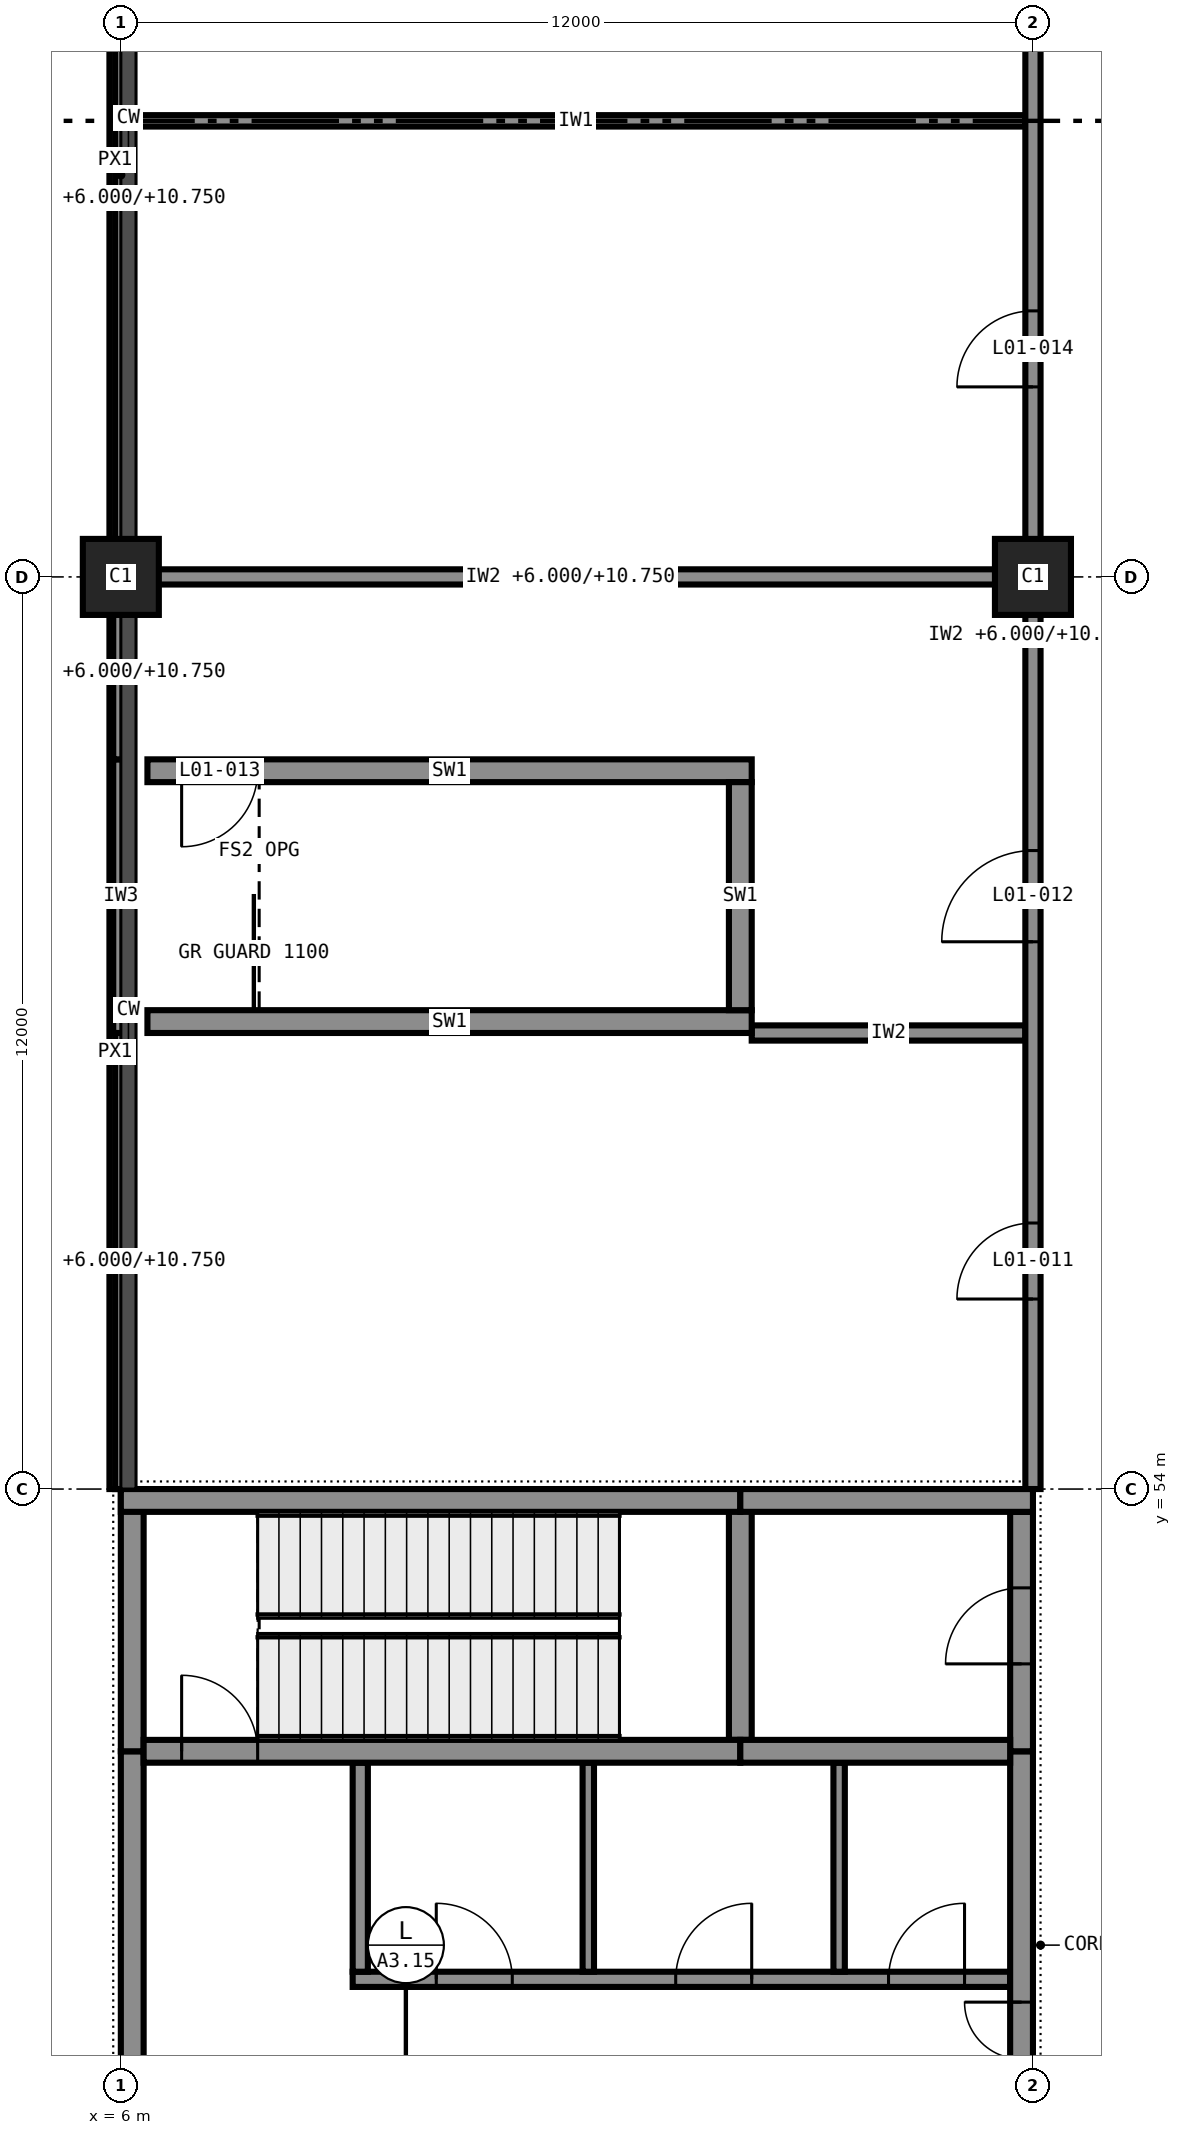
"""IFC4 building model, lengths in metres.
Left out: names, types, materials, properties, quantities, classifications, styles, units other than length and angle.
Written with IfcOpenShell. Run it as: python <this file> out.ifc"""

import sys

from ifc_helpers import new_model, si_unit, direction, frame, frame_2d, origin, origin_2d, place, context, subcontext, project, spatial, rectangle, extrude, element, fill, save


model = new_model("IFC4")
c1 = context("Model", 3, precision=1e-05, world=origin(), true_north=direction((0.0, 1.0)))
c2 = subcontext(c1, "Body", "Model", "MODEL_VIEW")
j1 = project(units=[si_unit("LENGTHUNIT", "METRE"), si_unit("PLANEANGLEUNIT", "RADIAN")], contexts=[c1])
p1 = place(None, origin())
s1 = spatial("IfcSite", under=j1, at=p1, CompositionType="ELEMENT")
p2 = place(p1, origin())
s2 = spatial("IfcBuilding", under=s1, at=p2, CompositionType="ELEMENT")
p3 = place(p2, frame((0.0, 0.0, 6.0)))
s3 = spatial("IfcBuildingStorey", under=s2, at=p3, CompositionType="ELEMENT", Elevation=6.0)
for number, where, z_axis, x_axis in (
    (1, (6.0, 66.0, 0.0), (0.0, 0.0, 1.0), (1.0, 0.0, 0.0)),
    (2, (18.0, 66.0, 0.0), (0.0, 0.0, 1.0), (1.0, 0.0, 0.0)),
):
    element("IfcColumn", number, at=place(p3, frame(where, z_axis=z_axis, x_axis=x_axis)), inside=s3, PredefinedType="COLUMN", context=c2, shape_type="SweptSolid", body=[
        extrude(rectangle(XDim=1.0, YDim=1.0, at=origin_2d()), origin(), (0.0, 0.0, 1.0), 6.0),
    ])
p4 = place(p3, frame((6.35, 60.15, 0.0), z_axis=(0.0, 0.0, 1.0), x_axis=(1.0, 0.0, 0.0)))
e3 = element("IfcWall", 3, at=p4, inside=s3, PredefinedType="SHEAR", context=c2, shape_type="SweptSolid", body=[
    extrude(rectangle(XDim=7.95, YDim=0.3, at=frame_2d((3.975, 0.0))), origin(), (0.0, 0.0, 1.0), 5.75),
])
p5 = place(p3, frame((6.35, 63.45, 0.0), z_axis=(0.0, 0.0, 1.0), x_axis=(1.0, 0.0, 0.0)))
e4 = element("IfcWall", 4, at=p5, inside=s3, PredefinedType="SHEAR", context=c2, shape_type="SweptSolid", body=[
    extrude(rectangle(XDim=7.95, YDim=0.3, at=frame_2d((3.975, 0.0))), origin(), (0.0, 0.0, 1.0), 5.75),
])
p6 = place(p5, frame((0.45, 0.0, 0.0)))
e5 = element("IfcOpeningElement", 5, at=p6, cuts=e4, PredefinedType="OPENING", context=c2, shape_type="SweptSolid", body=[
    extrude(rectangle(XDim=1.0, YDim=2.1, at=frame_2d((0.5, 1.05))), frame((0.0, 0.16, 0.0), z_axis=(0.0, -1.0, 0.0), x_axis=(1.0, 0.0, 0.0)), (0.0, 0.0, 1.0), 0.32),
])
p7 = place(p3, frame((14.15, 60.3, 0.0), z_axis=(0.0, 0.0, 1.0), x_axis=(0.0, 1.0, 0.0)))
e6 = element("IfcWall", 6, at=p7, inside=s3, PredefinedType="SHEAR", context=c2, shape_type="SweptSolid", body=[
    extrude(rectangle(XDim=3.0, YDim=0.3, at=frame_2d((1.5, 0.0))), origin(), (0.0, 0.0, 1.0), 5.75),
])
p8 = place(p3, frame((6.0, 53.85, 0.0), z_axis=(0.0, 0.0, 1.0), x_axis=(1.0, 0.0, 0.0)))
e7 = element("IfcWall", 7, at=p8, inside=s3, PredefinedType="SHEAR", context=c2, shape_type="SweptSolid", body=[
    extrude(rectangle(XDim=8.15, YDim=0.3, at=frame_2d((4.075, 0.0))), origin(), (0.0, 0.0, 1.0), 5.75),
])
p9 = place(p3, frame((14.15, 53.85, 0.0), z_axis=(0.0, 0.0, 1.0), x_axis=(1.0, 0.0, 0.0)))
e8 = element("IfcWall", 8, at=p9, inside=s3, PredefinedType="SHEAR", context=c2, shape_type="SweptSolid", body=[
    extrude(rectangle(XDim=3.85, YDim=0.3, at=frame_2d((1.925, 0.0))), origin(), (0.0, 0.0, 1.0), 5.75),
])
p10 = place(p3, frame((6.3, 50.55, 0.0), z_axis=(0.0, 0.0, 1.0), x_axis=(1.0, 0.0, 0.0)))
e9 = element("IfcWall", 9, at=p10, inside=s3, PredefinedType="SHEAR", context=c2, shape_type="SweptSolid", body=[
    extrude(rectangle(XDim=7.85, YDim=0.3, at=frame_2d((3.925, 0.0))), origin(), (0.0, 0.0, 1.0), 5.75),
])
p11 = place(p10, frame((0.5, 0.0, 0.0)))
e10 = element("IfcOpeningElement", 10, at=p11, cuts=e9, PredefinedType="OPENING", context=c2, shape_type="SweptSolid", body=[
    extrude(rectangle(XDim=1.0, YDim=2.1, at=frame_2d((0.5, 1.05))), frame((0.0, 0.16, 0.0), z_axis=(0.0, -1.0, 0.0), x_axis=(1.0, 0.0, 0.0)), (0.0, 0.0, 1.0), 0.32),
])
p12 = place(p3, frame((14.15, 50.55, 0.0), z_axis=(0.0, 0.0, 1.0), x_axis=(1.0, 0.0, 0.0)))
e11 = element("IfcWall", 11, at=p12, inside=s3, PredefinedType="SHEAR", context=c2, shape_type="SweptSolid", body=[
    extrude(rectangle(XDim=3.55, YDim=0.3, at=frame_2d((1.775, 0.0))), origin(), (0.0, 0.0, 1.0), 5.75),
])
p13 = place(p3, frame((6.15, 45.45, 0.0), z_axis=(0.0, 0.0, 1.0), x_axis=(0.0, 1.0, 0.0)))
e12 = element("IfcWall", 12, at=p13, inside=s3, PredefinedType="SHEAR", context=c2, shape_type="SweptSolid", body=[
    extrude(rectangle(XDim=5.1, YDim=0.3, at=frame_2d((2.55, 0.0))), origin(), (0.0, 0.0, 1.0), 5.75),
])
p14 = place(p3, frame((6.15, 50.55, 0.0), z_axis=(0.0, 0.0, 1.0), x_axis=(0.0, 1.0, 0.0)))
e13 = element("IfcWall", 13, at=p14, inside=s3, PredefinedType="SHEAR", context=c2, shape_type="SweptSolid", body=[
    extrude(rectangle(XDim=3.45, YDim=0.3, at=frame_2d((1.725, 0.0))), origin(), (0.0, 0.0, 1.0), 5.75),
])
p15 = place(p3, frame((17.85, 45.45, 0.0), z_axis=(0.0, 0.0, 1.0), x_axis=(0.0, 1.0, 0.0)))
e14 = element("IfcWall", 14, at=p15, inside=s3, PredefinedType="SHEAR", context=c2, shape_type="SweptSolid", body=[
    extrude(rectangle(XDim=5.1, YDim=0.3, at=frame_2d((2.55, 0.0))), origin(), (0.0, 0.0, 1.0), 5.75),
])
p16 = place(p15, frame((0.3, 0.0, 0.0)))
e15 = element("IfcOpeningElement", 15, at=p16, cuts=e14, PredefinedType="OPENING", context=c2, shape_type="SweptSolid", body=[
    extrude(rectangle(XDim=1.5, YDim=2.1, at=frame_2d((0.75, 1.05))), frame((0.0, 0.16, 0.0), z_axis=(0.0, -1.0, 0.0), x_axis=(1.0, 0.0, 0.0)), (0.0, 0.0, 1.0), 0.32),
])
p17 = place(p3, frame((17.85, 50.55, 0.0), z_axis=(0.0, 0.0, 1.0), x_axis=(0.0, 1.0, 0.0)))
e16 = element("IfcWall", 16, at=p17, inside=s3, PredefinedType="SHEAR", context=c2, shape_type="SweptSolid", body=[
    extrude(rectangle(XDim=3.15, YDim=0.3, at=frame_2d((1.575, 0.0))), origin(), (0.0, 0.0, 1.0), 5.75),
])
p18 = place(p17, frame((1.15, 0.0, 0.0)))
e17 = element("IfcOpeningElement", 17, at=p18, cuts=e16, PredefinedType="OPENING", context=c2, shape_type="SweptSolid", body=[
    extrude(rectangle(XDim=1.0, YDim=2.1, at=frame_2d((0.5, 1.05))), frame((0.0, 0.16, 0.0), z_axis=(0.0, -1.0, 0.0), x_axis=(1.0, 0.0, 0.0)), (0.0, 0.0, 1.0), 0.32),
])
p19 = place(p3, frame((14.15, 50.7, 0.0), z_axis=(0.0, 0.0, 1.0), x_axis=(0.0, 1.0, 0.0)))
e18 = element("IfcWall", 18, at=p19, inside=s3, PredefinedType="SHEAR", context=c2, shape_type="SweptSolid", body=[
    extrude(rectangle(XDim=3.3, YDim=0.3, at=frame_2d((1.65, 0.0))), origin(), (0.0, 0.0, 1.0), 5.75),
])
p20 = place(p3, frame((5.925, 77.5, 5.75), z_axis=(0.0, 0.0, 1.0), x_axis=(0.0, -1.0, 0.0)))
e19 = element("IfcWall", 19, at=p20, inside=s3, PredefinedType="STANDARD", context=c2, shape_type="SweptSolid", body=[
    extrude(rectangle(XDim=11.0, YDim=0.15, at=frame_2d((5.5, 0.0))), origin(), (0.0, 0.0, 1.0), 0.25),
])
p21 = place(p3, frame((5.925, 65.5, 5.75), z_axis=(0.0, 0.0, 1.0), x_axis=(0.0, -1.0, 0.0)))
e20 = element("IfcWall", 20, at=p21, inside=s3, PredefinedType="STANDARD", context=c2, shape_type="SweptSolid", body=[
    extrude(rectangle(XDim=11.5, YDim=0.15, at=frame_2d((5.75, 0.0))), origin(), (0.0, 0.0, 1.0), 0.25),
])
p22 = place(p3, frame((9.05, 47.55, 0.0), z_axis=(0.0, 0.0, 1.0), x_axis=(1.0, 0.0, 0.0)))
e21 = element("IfcWall", 21, at=p22, inside=s3, PredefinedType="PARTITIONING", context=c2, shape_type="SweptSolid", body=[
    extrude(rectangle(XDim=8.65, YDim=0.2, at=frame_2d((4.325, 0.0))), origin(), (0.0, 0.0, 1.0), 5.75),
])
p23 = place(p22, frame((1.1, 0.0, 0.0)))
e22 = element("IfcOpeningElement", 22, at=p23, cuts=e21, PredefinedType="OPENING", context=c2, shape_type="SweptSolid", body=[
    extrude(rectangle(XDim=1.0, YDim=2.1, at=frame_2d((0.5, 1.05))), frame((0.0, 0.11, 0.0), z_axis=(0.0, -1.0, 0.0), x_axis=(1.0, 0.0, 0.0)), (0.0, 0.0, 1.0), 0.22),
])
p24 = place(p22, frame((4.25, 0.0, 0.0)))
e23 = element("IfcOpeningElement", 23, at=p24, cuts=e21, PredefinedType="OPENING", context=c2, shape_type="SweptSolid", body=[
    extrude(rectangle(XDim=1.0, YDim=2.1, at=frame_2d((0.5, 1.05))), frame((0.0, 0.11, 0.0), z_axis=(0.0, -1.0, 0.0), x_axis=(1.0, 0.0, 0.0)), (0.0, 0.0, 1.0), 0.22),
])
p25 = place(p22, frame((7.05, 0.0, 0.0)))
e24 = element("IfcOpeningElement", 24, at=p25, cuts=e21, PredefinedType="OPENING", context=c2, shape_type="SweptSolid", body=[
    extrude(rectangle(XDim=1.0, YDim=2.1, at=frame_2d((0.5, 1.05))), frame((0.0, 0.11, 0.0), z_axis=(0.0, -1.0, 0.0), x_axis=(1.0, 0.0, 0.0)), (0.0, 0.0, 1.0), 0.22),
])
p26 = place(p3, frame((14.3, 60.0, 0.0), z_axis=(0.0, 0.0, 1.0), x_axis=(1.0, 0.0, 0.0)))
e25 = element("IfcWall", 25, at=p26, inside=s3, PredefinedType="PARTITIONING", context=c2, shape_type="SweptSolid", body=[
    extrude(rectangle(XDim=3.6, YDim=0.2, at=frame_2d((1.8, 0.0))), origin(), (0.0, 0.0, 1.0), 5.75),
])
p27 = place(p3, frame((5.925, 66.0, 0.0), z_axis=(0.0, 0.0, 1.0), x_axis=(1.0, 0.0, 0.0)))
e26 = element("IfcWall", 26, at=p27, inside=s3, PredefinedType="PARTITIONING", context=c2, shape_type="SweptSolid", body=[
    extrude(rectangle(XDim=11.975, YDim=0.2, at=frame_2d((5.987, 0.0))), origin(), (0.0, 0.0, 1.0), 4.75),
])
p28 = place(p3, frame((6.075, 72.0, 0.0), z_axis=(0.0, 0.0, 1.0), x_axis=(1.0, 0.0, 0.0)))
e27 = element("IfcWall", 27, at=p28, inside=s3, PredefinedType="PARTITIONING", context=c2, shape_type="SweptSolid", body=[
    extrude(rectangle(XDim=11.825, YDim=0.15, at=frame_2d((5.913, 0.0))), origin(), (0.0, 0.0, 1.0), 5.75),
])
p29 = place(p3, frame((6.0, 54.0, 0.0), z_axis=(0.0, 0.0, 1.0), x_axis=(0.0, 1.0, 0.0)))
e28 = element("IfcWall", 28, at=p29, inside=s3, PredefinedType="PARTITIONING", context=c2, shape_type="SweptSolid", body=[
    extrude(rectangle(XDim=6.0, YDim=0.15, at=frame_2d((3.0, 0.0))), origin(), (0.0, 0.0, 1.0), 4.75),
])
p30 = place(p3, frame((6.0, 60.0, 0.0), z_axis=(0.0, 0.0, 1.0), x_axis=(0.0, 1.0, 0.0)))
e29 = element("IfcWall", 29, at=p30, inside=s3, PredefinedType="PARTITIONING", context=c2, shape_type="SweptSolid", body=[
    extrude(rectangle(XDim=3.6, YDim=0.2, at=frame_2d((1.8, 0.0))), origin(), (0.0, 0.0, 1.0), 4.75),
])
p31 = place(p3, frame((6.0, 63.6, 0.0), z_axis=(0.0, 0.0, 1.0), x_axis=(0.0, 1.0, 0.0)))
e30 = element("IfcWall", 30, at=p31, inside=s3, PredefinedType="PARTITIONING", context=c2, shape_type="SweptSolid", body=[
    extrude(rectangle(XDim=2.3, YDim=0.2, at=frame_2d((1.15, 0.0))), origin(), (0.0, 0.0, 1.0), 4.75),
])
p32 = place(p3, frame((6.0, 66.1, 0.0), z_axis=(0.0, 0.0, 1.0), x_axis=(0.0, 1.0, 0.0)))
e31 = element("IfcWall", 31, at=p32, inside=s3, PredefinedType="PARTITIONING", context=c2, shape_type="SweptSolid", body=[
    extrude(rectangle(XDim=23.9, YDim=0.15, at=frame_2d((11.95, 0.0))), origin(), (0.0, 0.0, 1.0), 4.75),
])
p33 = place(p3, frame((9.15, 47.65, 0.0), z_axis=(0.0, 0.0, 1.0), x_axis=(0.0, 1.0, 0.0)))
e32 = element("IfcWall", 32, at=p33, inside=s3, PredefinedType="PARTITIONING", context=c2, shape_type="SweptSolid", body=[
    extrude(rectangle(XDim=2.75, YDim=0.2, at=frame_2d((1.375, 0.0))), origin(), (0.0, 0.0, 1.0), 5.75),
])
for number, where, z_axis, x_axis in (
    (33, (12.15, 47.65, 0.0), (0.0, 0.0, 1.0), (0.0, 1.0, 0.0)),
    (34, (15.45, 47.65, 0.0), (0.0, 0.0, 1.0), (0.0, 1.0, 0.0)),
):
    element("IfcWall", number, at=place(p3, frame(where, z_axis=z_axis, x_axis=x_axis)), inside=s3, PredefinedType="PARTITIONING", context=c2, shape_type="SweptSolid", body=[
        extrude(rectangle(XDim=2.75, YDim=0.15, at=frame_2d((1.375, 0.0))), origin(), (0.0, 0.0, 1.0), 5.75),
    ])
p34 = place(p3, frame((18.0, 54.0, 0.0), z_axis=(0.0, 0.0, 1.0), x_axis=(0.0, 1.0, 0.0)))
e35 = element("IfcWall", 35, at=p34, inside=s3, PredefinedType="PARTITIONING", context=c2, shape_type="SweptSolid", body=[
    extrude(rectangle(XDim=36.0, YDim=0.2, at=frame_2d((18.0, 0.0))), origin(), (0.0, 0.0, 1.0), 4.75),
])
p35 = place(p34, frame((2.5, 0.0, 0.0)))
e36 = element("IfcOpeningElement", 36, at=p35, cuts=e35, PredefinedType="OPENING", context=c2, shape_type="SweptSolid", body=[
    extrude(rectangle(XDim=1.0, YDim=2.1, at=frame_2d((0.5, 1.05))), frame((0.0, 0.11, 0.0), z_axis=(0.0, -1.0, 0.0), x_axis=(1.0, 0.0, 0.0)), (0.0, 0.0, 1.0), 0.22),
])
p36 = place(p34, frame((7.2, 0.0, 0.0)))
e37 = element("IfcOpeningElement", 37, at=p36, cuts=e35, PredefinedType="OPENING", context=c2, shape_type="SweptSolid", body=[
    extrude(rectangle(XDim=1.2, YDim=2.1, at=frame_2d((0.6, 1.05))), frame((0.0, 0.11, 0.0), z_axis=(0.0, -1.0, 0.0), x_axis=(1.0, 0.0, 0.0)), (0.0, 0.0, 1.0), 0.22),
])
p37 = place(p34, frame((14.5, 0.0, 0.0)))
e38 = element("IfcOpeningElement", 38, at=p37, cuts=e35, PredefinedType="OPENING", context=c2, shape_type="SweptSolid", body=[
    extrude(rectangle(XDim=1.0, YDim=2.1, at=frame_2d((0.5, 1.05))), frame((0.0, 0.11, 0.0), z_axis=(0.0, -1.0, 0.0), x_axis=(1.0, 0.0, 0.0)), (0.0, 0.0, 1.0), 0.22),
])
p38 = place(p34, frame((20.5, 0.0, 0.0)))
e39 = element("IfcOpeningElement", 39, at=p38, cuts=e35, PredefinedType="OPENING", context=c2, shape_type="SweptSolid", body=[
    extrude(rectangle(XDim=1.0, YDim=2.1, at=frame_2d((0.5, 1.05))), frame((0.0, 0.11, 0.0), z_axis=(0.0, -1.0, 0.0), x_axis=(1.0, 0.0, 0.0)), (0.0, 0.0, 1.0), 0.22),
])
p39 = place(p34, frame((26.5, 0.0, 0.0)))
e40 = element("IfcOpeningElement", 40, at=p39, cuts=e35, PredefinedType="OPENING", context=c2, shape_type="SweptSolid", body=[
    extrude(rectangle(XDim=1.0, YDim=2.1, at=frame_2d((0.5, 1.05))), frame((0.0, 0.11, 0.0), z_axis=(0.0, -1.0, 0.0), x_axis=(1.0, 0.0, 0.0)), (0.0, 0.0, 1.0), 0.22),
])
p40 = place(p34, frame((32.5, 0.0, 0.0)))
e41 = element("IfcOpeningElement", 41, at=p40, cuts=e35, PredefinedType="OPENING", context=c2, shape_type="SweptSolid", body=[
    extrude(rectangle(XDim=1.0, YDim=2.1, at=frame_2d((0.5, 1.05))), frame((0.0, 0.11, 0.0), z_axis=(0.0, -1.0, 0.0), x_axis=(1.0, 0.0, 0.0)), (0.0, 0.0, 1.0), 0.22),
])
p41 = place(p16, origin())
e42 = element("IfcDoor", 42, at=p41, inside=s3, OperationType="DOUBLE_DOOR_SINGLE_SWING", PredefinedType="DOOR", context=c2, shape_type="SweptSolid", body=[
    extrude(rectangle(XDim=1.5, YDim=2.1, at=frame_2d((0.75, 1.05))), frame((0.0, 0.025, 0.0), z_axis=(0.0, -1.0, 0.0), x_axis=(1.0, 0.0, 0.0)), (0.0, 0.0, 1.0), 0.05),
])
fill(e15, e42)
p42 = place(p23, origin())
e43 = element("IfcDoor", 43, at=p42, inside=s3, OperationType="SINGLE_SWING_RIGHT", PredefinedType="DOOR", context=c2, shape_type="SweptSolid", body=[
    extrude(rectangle(XDim=1.0, YDim=2.1, at=frame_2d((0.5, 1.05))), frame((0.0, 0.025, 0.0), z_axis=(0.0, -1.0, 0.0), x_axis=(1.0, 0.0, 0.0)), (0.0, 0.0, 1.0), 0.05),
])
fill(e22, e43)
p43 = place(p24, origin())
e44 = element("IfcDoor", 44, at=p43, inside=s3, OperationType="SINGLE_SWING_LEFT", PredefinedType="DOOR", context=c2, shape_type="SweptSolid", body=[
    extrude(rectangle(XDim=1.0, YDim=2.1, at=frame_2d((0.5, 1.05))), frame((0.0, 0.025, 0.0), z_axis=(0.0, -1.0, 0.0), x_axis=(1.0, 0.0, 0.0)), (0.0, 0.0, 1.0), 0.05),
])
fill(e23, e44)
p44 = place(p25, origin())
e45 = element("IfcDoor", 45, at=p44, inside=s3, OperationType="SINGLE_SWING_LEFT", PredefinedType="DOOR", context=c2, shape_type="SweptSolid", body=[
    extrude(rectangle(XDim=1.0, YDim=2.1, at=frame_2d((0.5, 1.05))), frame((0.0, 0.025, 0.0), z_axis=(0.0, -1.0, 0.0), x_axis=(1.0, 0.0, 0.0)), (0.0, 0.0, 1.0), 0.05),
])
fill(e24, e45)
p45 = place(p11, origin())
e46 = element("IfcDoor", 46, at=p45, inside=s3, OperationType="SINGLE_SWING_RIGHT", PredefinedType="DOOR", context=c2, shape_type="SweptSolid", body=[
    extrude(rectangle(XDim=1.0, YDim=2.1, at=frame_2d((0.5, 1.05))), frame((0.0, 0.025, 0.0), z_axis=(0.0, -1.0, 0.0), x_axis=(1.0, 0.0, 0.0)), (0.0, 0.0, 1.0), 0.05),
])
fill(e10, e46)
p46 = place(p18, origin())
e47 = element("IfcDoor", 47, at=p46, inside=s3, OperationType="SINGLE_SWING_RIGHT", PredefinedType="DOOR", context=c2, shape_type="SweptSolid", body=[
    extrude(rectangle(XDim=1.0, YDim=2.1, at=frame_2d((0.5, 1.05))), frame((0.0, 0.025, 0.0), z_axis=(0.0, -1.0, 0.0), x_axis=(1.0, 0.0, 0.0)), (0.0, 0.0, 1.0), 0.05),
])
fill(e17, e47)
p47 = place(p35, origin())
e48 = element("IfcDoor", 48, at=p47, inside=s3, OperationType="SINGLE_SWING_RIGHT", PredefinedType="DOOR", context=c2, shape_type="SweptSolid", body=[
    extrude(rectangle(XDim=1.0, YDim=2.1, at=frame_2d((0.5, 1.05))), frame((0.0, 0.025, 0.0), z_axis=(0.0, -1.0, 0.0), x_axis=(1.0, 0.0, 0.0)), (0.0, 0.0, 1.0), 0.05),
])
fill(e36, e48)
p48 = place(p36, origin())
e49 = element("IfcDoor", 49, at=p48, inside=s3, OperationType="SINGLE_SWING_RIGHT", PredefinedType="DOOR", context=c2, shape_type="SweptSolid", body=[
    extrude(rectangle(XDim=1.2, YDim=2.1, at=frame_2d((0.6, 1.05))), frame((0.0, 0.025, 0.0), z_axis=(0.0, -1.0, 0.0), x_axis=(1.0, 0.0, 0.0)), (0.0, 0.0, 1.0), 0.05),
])
fill(e37, e49)
p49 = place(p6, frame((1.0, 0.0, 0.0), z_axis=(0.0, 0.0, 1.0), x_axis=(-1.0, 0.0, 0.0)))
e50 = element("IfcDoor", 50, at=p49, inside=s3, OperationType="SINGLE_SWING_LEFT", PredefinedType="DOOR", context=c2, shape_type="SweptSolid", body=[
    extrude(rectangle(XDim=1.0, YDim=2.1, at=frame_2d((0.5, 1.05))), frame((0.0, 0.025, 0.0), z_axis=(0.0, -1.0, 0.0), x_axis=(1.0, 0.0, 0.0)), (0.0, 0.0, 1.0), 0.05),
])
fill(e5, e50)
p50 = place(p37, origin())
e51 = element("IfcDoor", 51, at=p50, inside=s3, OperationType="SINGLE_SWING_RIGHT", PredefinedType="DOOR", context=c2, shape_type="SweptSolid", body=[
    extrude(rectangle(XDim=1.0, YDim=2.1, at=frame_2d((0.5, 1.05))), frame((0.0, 0.025, 0.0), z_axis=(0.0, -1.0, 0.0), x_axis=(1.0, 0.0, 0.0)), (0.0, 0.0, 1.0), 0.05),
])
fill(e38, e51)
save(model, sys.argv[1])
